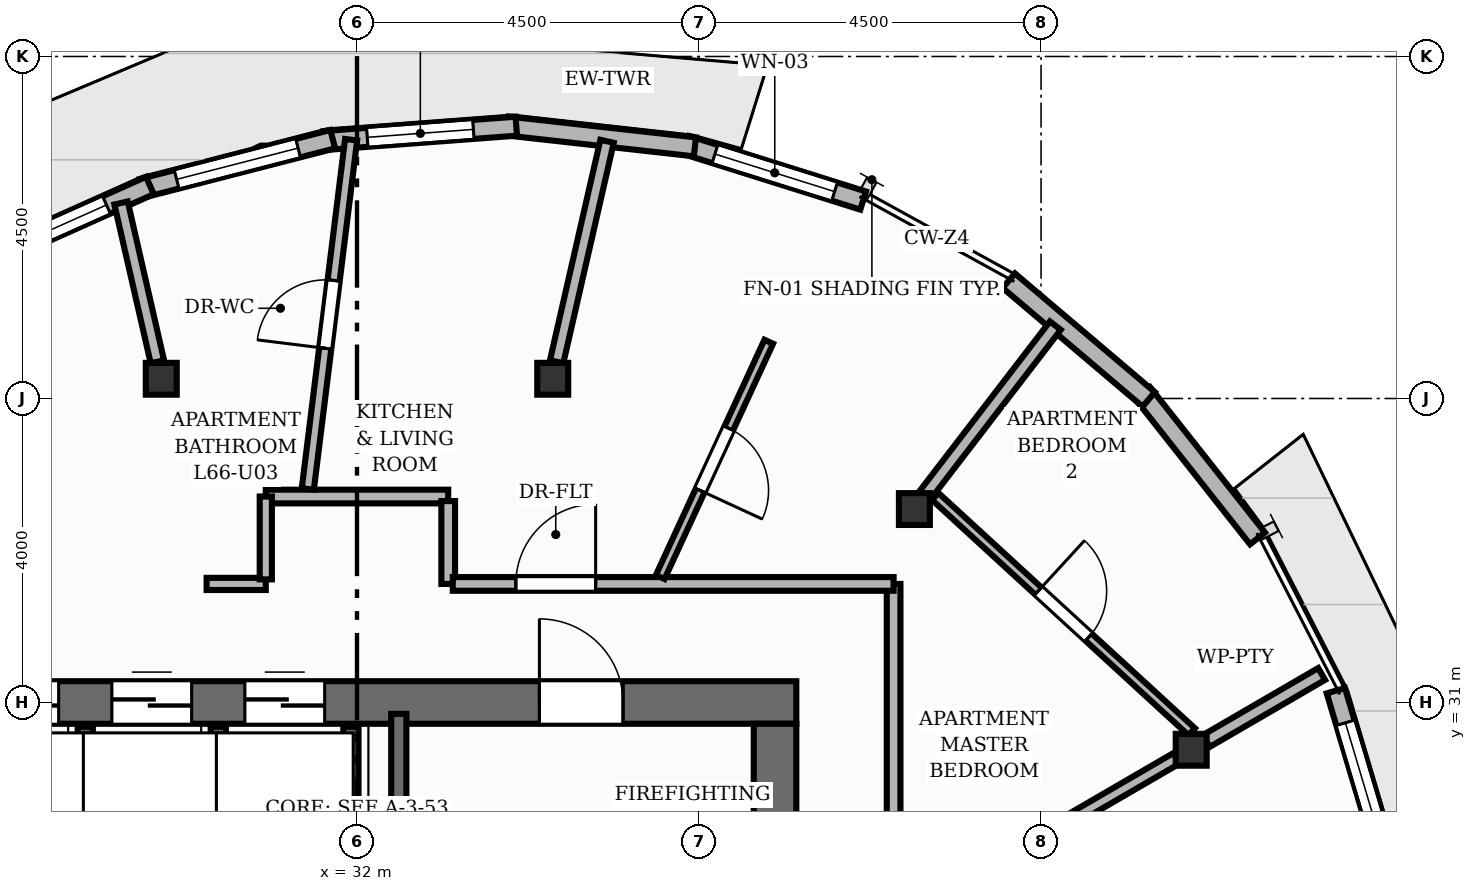
"""IFC4 building model, lengths in metres.
Left out: names, types, materials, properties, quantities, classifications, styles, units other than length and angle.
Written with IfcOpenShell. Run it as: python <this file> out.ifc"""

import sys

from ifc_helpers import new_model, si_unit, direction, frame, frame_2d, origin, origin_2d, place, context, subcontext, project, spatial, rectangle, i_section, extrude, element, fill, save


model = new_model("IFC4")
c1 = context("Model", 3, precision=1e-05, world=origin(), true_north=direction((0.0, 1.0)))
c2 = subcontext(c1, "Body", "Model", "MODEL_VIEW")
j1 = project(units=[si_unit("LENGTHUNIT", "METRE"), si_unit("PLANEANGLEUNIT", "RADIAN")], contexts=[c1])
p1 = place(None, origin())
s1 = spatial("IfcSite", under=j1, at=p1, CompositionType="ELEMENT")
p2 = place(p1, origin())
s2 = spatial("IfcBuilding", under=s1, at=p2, CompositionType="ELEMENT")
p3 = place(p2, frame((0.0, 0.0, 220.64)))
s3 = spatial("IfcBuildingStorey", under=s2, at=p3, CompositionType="ELEMENT", Elevation=220.64)
p4 = place(p3, frame((26.22, 31.0, 0.0), z_axis=(0.0, 0.0, 1.0), x_axis=(1.0, 0.0, 0.0)))
e1 = element("IfcWall", 1, at=p4, inside=s3, PredefinedType="SHEAR", context=c2, shape_type="SweptSolid", body=[
    extrude(rectangle(XDim=11.56, YDim=0.56, at=frame_2d((5.78, 0.0))), origin(), (0.0, 0.0, 1.0), 3.2),
])
p5 = place(p4, frame((8.18, 0.0, 0.0)))
e2 = element("IfcOpeningElement", 2, at=p5, cuts=e1, PredefinedType="OPENING", context=c2, shape_type="SweptSolid", body=[
    extrude(rectangle(XDim=1.1, YDim=2.15, at=frame_2d((0.55, 1.075))), frame((0.0, 0.29, 0.0), z_axis=(0.0, -1.0, 0.0), x_axis=(1.0, 0.0, 0.0)), (0.0, 0.0, 1.0), 0.58),
])
p6 = place(p4, frame((0.805, 0.0, 0.0)))
e3 = element("IfcOpeningElement", 3, at=p6, cuts=e1, PredefinedType="OPENING", context=c2, shape_type="SweptSolid", body=[
    extrude(rectangle(XDim=1.05, YDim=2.15, at=frame_2d((0.525, 1.075))), frame((0.0, 0.29, 0.0), z_axis=(0.0, -1.0, 0.0), x_axis=(1.0, 0.0, 0.0)), (0.0, 0.0, 1.0), 0.58),
])
p7 = place(p4, frame((2.555, 0.0, 0.0)))
e4 = element("IfcOpeningElement", 4, at=p7, cuts=e1, PredefinedType="OPENING", context=c2, shape_type="SweptSolid", body=[
    extrude(rectangle(XDim=1.05, YDim=2.15, at=frame_2d((0.525, 1.075))), frame((0.0, 0.29, 0.0), z_axis=(0.0, -1.0, 0.0), x_axis=(1.0, 0.0, 0.0)), (0.0, 0.0, 1.0), 0.58),
])
p8 = place(p4, frame((4.305, 0.0, 0.0)))
e5 = element("IfcOpeningElement", 5, at=p8, cuts=e1, PredefinedType="OPENING", context=c2, shape_type="SweptSolid", body=[
    extrude(rectangle(XDim=1.05, YDim=2.15, at=frame_2d((0.525, 1.075))), frame((0.0, 0.29, 0.0), z_axis=(0.0, -1.0, 0.0), x_axis=(1.0, 0.0, 0.0)), (0.0, 0.0, 1.0), 0.58),
])
p9 = place(p3, frame((37.5, 17.28, 0.0), z_axis=(0.0, 0.0, 1.0), x_axis=(0.0, 1.0, 0.0)))
e6 = element("IfcWall", 6, at=p9, inside=s3, PredefinedType="SHEAR", context=c2, shape_type="SweptSolid", body=[
    extrude(rectangle(XDim=13.44, YDim=0.56, at=frame_2d((6.72, 0.0))), origin(), (0.0, 0.0, 1.0), 3.2),
])
for number, where, z_axis, x_axis in (
    (7, (42.975, 30.378, 0.0), (0.0, 0.0, 1.0), (1.0, 0.0, 0.0)),
    (8, (39.333, 33.545, 0.0), (0.0, 0.0, 1.0), (1.0, 0.0, 0.0)),
    (9, (34.575, 35.26, 0.0), (0.0, 0.0, 1.0), (1.0, 0.0, 0.0)),
    (10, (29.425, 35.26, 0.0), (0.0, 0.0, 1.0), (1.0, 0.0, 0.0)),
):
    element("IfcColumn", number, at=place(p3, frame(where, z_axis=z_axis, x_axis=x_axis)), inside=s3, PredefinedType="COLUMN", context=c2, shape_type="SweptSolid", body=[
        extrude(i_section(OverallWidth=0.407, OverallDepth=0.419, WebThickness=0.031, FlangeThickness=0.049, at=origin_2d()), origin(), (0.0, 0.0, 1.0), 3.2),
    ])
p10 = place(p3, frame((36.334, 38.334, 0.0), z_axis=(0.0, 0.0, 1.0), x_axis=(0.95407801166, -0.299558254212, 0.0)))
e11 = element("IfcWall", 11, at=p10, inside=s3, PredefinedType="SOLIDWALL", context=c2, shape_type="SweptSolid", body=[
    extrude(rectangle(XDim=2.437, YDim=0.25, at=frame_2d((1.218, 0.0))), origin(), (0.0, 0.0, 1.0), 2.96),
])
p11 = place(p10, frame((0.393, 0.0, 0.85)))
e12 = element("IfcOpeningElement", 12, at=p11, cuts=e11, PredefinedType="OPENING", context=c2, shape_type="SweptSolid", body=[
    extrude(rectangle(XDim=1.65, YDim=1.55, at=frame_2d((0.825, 0.775))), frame((0.0, 0.135, 0.0), z_axis=(0.0, -1.0, 0.0), x_axis=(1.0, 0.0, 0.0)), (0.0, 0.0, 1.0), 0.27),
])
p12 = place(p3, frame((33.983, 38.585, 0.0), z_axis=(0.0, 0.0, 1.0), x_axis=(0.993859679734, -0.110647806121, 0.0)))
e13 = element("IfcWall", 13, at=p12, inside=s3, PredefinedType="SOLIDWALL", context=c2, shape_type="SweptSolid", body=[
    extrude(rectangle(XDim=2.478, YDim=0.25, at=frame_2d((1.239, 0.0))), origin(), (0.0, 0.0, 1.0), 2.96),
])
p13 = place(p3, frame((31.571, 38.394, 0.0), z_axis=(0.0, 0.0, 1.0), x_axis=(0.997203982256, 0.074727623888, 0.0)))
e14 = element("IfcWall", 14, at=p13, inside=s3, PredefinedType="SOLIDWALL", context=c2, shape_type="SweptSolid", body=[
    extrude(rectangle(XDim=2.532, YDim=0.25, at=frame_2d((1.266, 0.0))), origin(), (0.0, 0.0, 1.0), 2.96),
])
p14 = place(p13, frame((0.566, 0.0, 0.85)))
e15 = element("IfcOpeningElement", 15, at=p14, cuts=e14, PredefinedType="OPENING", context=c2, shape_type="SweptSolid", body=[
    extrude(rectangle(XDim=1.4, YDim=1.55, at=frame_2d((0.7, 0.775))), frame((0.0, 0.135, 0.0), z_axis=(0.0, -1.0, 0.0), x_axis=(1.0, 0.0, 0.0)), (0.0, 0.0, 1.0), 0.27),
])
p15 = place(p3, frame((29.171, 37.766, 0.0), z_axis=(0.0, 0.0, 1.0), x_axis=(0.968423445169, 0.249311112562, 0.0)))
e16 = element("IfcWall", 16, at=p15, inside=s3, PredefinedType="SOLIDWALL", context=c2, shape_type="SweptSolid", body=[
    extrude(rectangle(XDim=2.592, YDim=0.25, at=frame_2d((1.296, 0.0))), origin(), (0.0, 0.0, 1.0), 2.96),
])
p16 = place(p15, frame((0.471, 0.0, 0.85)))
e17 = element("IfcOpeningElement", 17, at=p16, cuts=e16, PredefinedType="OPENING", context=c2, shape_type="SweptSolid", body=[
    extrude(rectangle(XDim=1.65, YDim=1.55, at=frame_2d((0.825, 0.775))), frame((0.0, 0.135, 0.0), z_axis=(0.0, -1.0, 0.0), x_axis=(1.0, 0.0, 0.0)), (0.0, 0.0, 1.0), 0.27),
])
p17 = place(p3, frame((26.855, 36.719, 0.0), z_axis=(0.0, 0.0, 1.0), x_axis=(0.912779399898, 0.408452894617, 0.0)))
e18 = element("IfcWall", 18, at=p17, inside=s3, PredefinedType="SOLIDWALL", context=c2, shape_type="SweptSolid", body=[
    extrude(rectangle(XDim=2.651, YDim=0.25, at=frame_2d((1.325, 0.0))), origin(), (0.0, 0.0, 1.0), 2.96),
])
p18 = place(p17, frame((0.625, 0.0, 0.85)))
e19 = element("IfcOpeningElement", 19, at=p18, cuts=e18, PredefinedType="OPENING", context=c2, shape_type="SweptSolid", body=[
    extrude(rectangle(XDim=1.4, YDim=1.52, at=frame_2d((0.7, 0.76))), frame((0.0, 0.135, 0.0), z_axis=(0.0, -1.0, 0.0), x_axis=(1.0, 0.0, 0.0)), (0.0, 0.0, 1.0), 0.27),
])
p19 = place(p3, frame((44.878, 31.156, 0.0), z_axis=(0.0, 0.0, 1.0), x_axis=(0.285604720301, -0.958347506775, 0.0)))
e20 = element("IfcWall", 20, at=p19, inside=s3, PredefinedType="SOLIDWALL", context=c2, shape_type="SweptSolid", body=[
    extrude(rectangle(XDim=2.532, YDim=0.25, at=frame_2d((1.266, 0.0))), origin(), (0.0, 0.0, 1.0), 2.96),
])
p20 = place(p19, frame((0.441, 0.0, 0.85)))
e21 = element("IfcOpeningElement", 21, at=p20, cuts=e20, PredefinedType="OPENING", context=c2, shape_type="SweptSolid", body=[
    extrude(rectangle(XDim=1.65, YDim=1.55, at=frame_2d((0.825, 0.775))), frame((0.0, 0.135, 0.0), z_axis=(0.0, -1.0, 0.0), x_axis=(1.0, 0.0, 0.0)), (0.0, 0.0, 1.0), 0.27),
])
p21 = place(p3, frame((42.337, 35.071, 0.0), z_axis=(0.0, 0.0, 1.0), x_axis=(0.619881401672, -0.784695512833, 0.0)))
e22 = element("IfcWall", 22, at=p21, inside=s3, PredefinedType="SOLIDWALL", context=c2, shape_type="SweptSolid", body=[
    extrude(rectangle(XDim=2.437, YDim=0.25, at=frame_2d((1.218, 0.0))), origin(), (0.0, 0.0, 1.0), 2.96),
])
p22 = place(p3, frame((40.575, 36.55, 0.0), z_axis=(0.0, 0.0, 1.0), x_axis=(0.762614923672, -0.646852748462, 0.0)))
e23 = element("IfcWall", 23, at=p22, inside=s3, PredefinedType="SOLIDWALL", context=c2, shape_type="SweptSolid", body=[
    extrude(rectangle(XDim=2.415, YDim=0.25, at=frame_2d((1.208, 0.0))), origin(), (0.0, 0.0, 1.0), 2.96),
])
p23 = place(p3, frame((32.55, 27.35, 0.0), z_axis=(0.0, 0.0, 1.0), x_axis=(0.0, 1.0, 0.0)))
e24 = element("IfcWall", 24, at=p23, inside=s3, PredefinedType="SHEAR", context=c2, shape_type="SweptSolid", body=[
    extrude(rectangle(XDim=3.5, YDim=0.2, at=frame_2d((1.75, 0.0))), origin(), (0.0, 0.0, 1.0), 3.2),
])
for number, where, z_axis, x_axis in (
    (25, (31.92, 29.02, 0.0), (0.0, 0.0, 1.0), (0.0, 1.0, 0.0)),
    (26, (28.425, 29.02, 0.0), (0.0, 0.0, 1.0), (0.0, 1.0, 0.0)),
    (27, (30.175, 29.02, 0.0), (0.0, 0.0, 1.0), (0.0, 1.0, 0.0)),
):
    element("IfcWall", number, at=place(p3, frame(where, z_axis=z_axis, x_axis=x_axis)), inside=s3, PredefinedType="SHEAR", context=c2, shape_type="SweptSolid", body=[
        extrude(rectangle(XDim=1.66, YDim=0.2, at=frame_2d((0.83, 0.0))), origin(), (0.0, 0.0, 1.0), 3.2),
    ])
p24 = place(p3, frame((43.174, 30.493, 0.0), z_axis=(0.0, 0.0, 1.0), x_axis=(0.864599922959, 0.502460917106, 0.0)))
e28 = element("IfcWall", 28, at=p24, inside=s3, PredefinedType="PARTITIONING", context=c2, shape_type="SweptSolid", body=[
    extrude(rectangle(XDim=1.756, YDim=0.18, at=frame_2d((0.878, 0.0))), origin(), (0.0, 0.0, 1.0), 2.404),
])
p25 = place(p3, frame((39.473, 33.727, 0.0), z_axis=(0.0, 0.0, 1.0), x_axis=(0.609232660573, 0.792991529142, 0.0)))
e29 = element("IfcWall", 29, at=p25, inside=s3, PredefinedType="PARTITIONING", context=c2, shape_type="SweptSolid", body=[
    extrude(rectangle(XDim=2.814, YDim=0.18, at=frame_2d((1.407, 0.0))), origin(), (0.0, 0.0, 1.0), 2.404),
])
p26 = place(p3, frame((34.626, 35.483, 0.0), z_axis=(0.0, 0.0, 1.0), x_axis=(0.22291168124, 0.974838644272, 0.0)))
e30 = element("IfcWall", 30, at=p26, inside=s3, PredefinedType="PARTITIONING", context=c2, shape_type="SweptSolid", body=[
    extrude(rectangle(XDim=2.976, YDim=0.18, at=frame_2d((1.488, 0.0))), origin(), (0.0, 0.0, 1.0), 2.404),
])
p27 = place(p3, frame((29.374, 35.483, 0.0), z_axis=(0.0, 0.0, 1.0), x_axis=(-0.222945438732, 0.974830924493, 0.0)))
e31 = element("IfcWall", 31, at=p27, inside=s3, PredefinedType="PARTITIONING", context=c2, shape_type="SweptSolid", body=[
    extrude(rectangle(XDim=2.143, YDim=0.18, at=frame_2d((1.072, 0.0))), origin(), (0.0, 0.0, 1.0), 2.404),
])
p28 = place(p3, frame((39.06, 32.56, 0.0), z_axis=(0.0, 0.0, 1.0), x_axis=(0.0, -1.0, 0.0)))
e32 = element("IfcWall", 32, at=p28, inside=s3, PredefinedType="PARTITIONING", context=c2, shape_type="SweptSolid", body=[
    extrude(rectangle(XDim=17.12, YDim=0.18, at=frame_2d((8.56, 0.0))), origin(), (0.0, 0.0, 1.0), 2.955),
])
p29 = place(p28, frame((8.815, 0.0, 0.0)))
e33 = element("IfcOpeningElement", 33, at=p29, cuts=e32, PredefinedType="OPENING", context=c2, shape_type="SweptSolid", body=[
    extrude(rectangle(XDim=1.05, YDim=2.15, at=frame_2d((0.525, 1.075))), frame((0.0, 0.1, 0.0), z_axis=(0.0, -1.0, 0.0), x_axis=(1.0, 0.0, 0.0)), (0.0, 0.0, 1.0), 0.2),
])
p30 = place(p3, frame((30.8, 33.71, 0.0), z_axis=(0.0, 0.0, 1.0), x_axis=(1.0, 0.0, 0.0)))
e34 = element("IfcWall", 34, at=p30, inside=s3, PredefinedType="PARTITIONING", context=c2, shape_type="SweptSolid", body=[
    extrude(rectangle(XDim=2.4, YDim=0.18, at=frame_2d((1.2, 0.0))), origin(), (0.0, 0.0, 1.0), 2.955),
])
p31 = place(p3, frame((33.2, 33.65, 0.0), z_axis=(0.0, 0.0, 1.0), x_axis=(0.0, -1.0, 0.0)))
e35 = element("IfcWall", 35, at=p31, inside=s3, PredefinedType="PARTITIONING", context=c2, shape_type="SweptSolid", body=[
    extrude(rectangle(XDim=1.09, YDim=0.18, at=frame_2d((0.545, 0.0))), origin(), (0.0, 0.0, 1.0), 2.955),
])
p32 = place(p3, frame((33.26, 32.56, 0.0), z_axis=(0.0, 0.0, 1.0), x_axis=(1.0, 0.0, 0.0)))
e36 = element("IfcWall", 36, at=p32, inside=s3, PredefinedType="PARTITIONING", context=c2, shape_type="SweptSolid", body=[
    extrude(rectangle(XDim=5.8, YDim=0.18, at=frame_2d((2.9, 0.0))), origin(), (0.0, 0.0, 1.0), 2.955),
])
p33 = place(p32, frame((0.83, 0.0, 0.0)))
e37 = element("IfcOpeningElement", 37, at=p33, cuts=e36, PredefinedType="OPENING", context=c2, shape_type="SweptSolid", body=[
    extrude(rectangle(XDim=1.05, YDim=2.15, at=frame_2d((0.525, 1.075))), frame((0.0, 0.1, 0.0), z_axis=(0.0, -1.0, 0.0), x_axis=(1.0, 0.0, 0.0)), (0.0, 0.0, 1.0), 0.2),
])
p34 = place(p3, frame((30.022, 32.56, 0.0), z_axis=(0.0, 0.0, 1.0), x_axis=(1.0, 0.0, 0.0)))
e38 = element("IfcWall", 38, at=p34, inside=s3, PredefinedType="PLUMBINGWALL", context=c2, shape_type="SweptSolid", body=[
    extrude(rectangle(XDim=0.778, YDim=0.16, at=frame_2d((0.389, 0.0))), origin(), (0.0, 0.0, 1.0), 2.955),
])
p35 = place(p3, frame((30.8, 32.62, 0.0), z_axis=(0.0, 0.0, 1.0), x_axis=(0.0, 1.0, 0.0)))
e39 = element("IfcWall", 39, at=p35, inside=s3, PredefinedType="PLUMBINGWALL", context=c2, shape_type="SweptSolid", body=[
    extrude(rectangle(XDim=1.09, YDim=0.16, at=frame_2d((0.545, 0.0))), origin(), (0.0, 0.0, 1.0), 2.955),
])
p36 = place(p3, frame((39.06, 28.103, 0.0), z_axis=(0.0, 0.0, 1.0), x_axis=(0.864618907014, 0.502428249239, 0.0)))
e40 = element("IfcWall", 40, at=p36, inside=s3, PredefinedType="PLUMBINGWALL", context=c2, shape_type="SweptSolid", body=[
    extrude(rectangle(XDim=4.305, YDim=0.16, at=frame_2d((2.153, 0.0))), origin(), (0.0, 0.0, 1.0), 2.404),
])
p37 = place(p3, frame((31.353, 33.809, 0.0), z_axis=(0.0, 0.0, 1.0), x_axis=(0.123041966912, 0.992401468348, 0.0)))
e41 = element("IfcWall", 41, at=p37, inside=s3, PredefinedType="PLUMBINGWALL", context=c2, shape_type="SweptSolid", body=[
    extrude(rectangle(XDim=4.631, YDim=0.16, at=frame_2d((2.315, 0.0))), origin(), (0.0, 0.0, 1.0), 2.692),
])
p38 = place(p37, frame((1.865, 0.0, 0.0)))
e42 = element("IfcOpeningElement", 42, at=p38, cuts=e41, PredefinedType="OPENING", context=c2, shape_type="SweptSolid", body=[
    extrude(rectangle(XDim=0.9, YDim=2.1, at=frame_2d((0.45, 1.05))), frame((0.0, 0.09, 0.0), z_axis=(0.0, -1.0, 0.0), x_axis=(1.0, 0.0, 0.0)), (0.0, 0.0, 1.0), 0.18),
])
p39 = place(p3, frame((37.417, 35.747, 0.0), z_axis=(0.0, 0.0, 1.0), x_axis=(-0.41880384085, -0.908076727424, 0.0)))
e43 = element("IfcWall", 43, at=p39, inside=s3, PredefinedType="PARTITIONING", context=c2, shape_type="SweptSolid", body=[
    extrude(rectangle(XDim=3.409, YDim=0.125, at=frame_2d((1.705, 0.0))), origin(), (0.0, 0.0, 1.0), 2.955),
])
p40 = place(p39, frame((1.255, 0.0, 0.0)))
e44 = element("IfcOpeningElement", 44, at=p40, cuts=e43, PredefinedType="OPENING", context=c2, shape_type="SweptSolid", body=[
    extrude(rectangle(XDim=0.9, YDim=2.1, at=frame_2d((0.45, 1.05))), frame((0.0, 0.073, 0.0), z_axis=(0.0, -1.0, 0.0), x_axis=(1.0, 0.0, 0.0)), (0.0, 0.0, 1.0), 0.145),
])
p41 = place(p3, frame((39.607, 33.712, 0.0), z_axis=(0.0, 0.0, 1.0), x_axis=(0.736828890574, -0.676079274949, 0.0)))
e45 = element("IfcWall", 45, at=p41, inside=s3, PredefinedType="PARTITIONING", context=c2, shape_type="SweptSolid", body=[
    extrude(rectangle(XDim=4.582, YDim=0.125, at=frame_2d((2.291, 0.0))), origin(), (0.0, 0.0, 1.0), 2.488),
])
p42 = place(p41, frame((1.841, 0.0, 0.0)))
e46 = element("IfcOpeningElement", 46, at=p42, cuts=e45, PredefinedType="OPENING", context=c2, shape_type="SweptSolid", body=[
    extrude(rectangle(XDim=0.9, YDim=2.1, at=frame_2d((0.45, 1.05))), frame((0.0, 0.073, 0.0), z_axis=(0.0, -1.0, 0.0), x_axis=(1.0, 0.0, 0.0)), (0.0, 0.0, 1.0), 0.145),
])
p43 = place(p11, origin())
e47 = element("IfcWindow", 47, at=p43, inside=s3, PartitioningType="SINGLE_PANEL", PredefinedType="WINDOW", context=c2, shape_type="SweptSolid", body=[
    extrude(rectangle(XDim=1.65, YDim=1.55, at=frame_2d((0.825, 0.775))), frame((0.0, 0.03, 0.0), z_axis=(0.0, -1.0, 0.0), x_axis=(1.0, 0.0, 0.0)), (0.0, 0.0, 1.0), 0.06),
])
fill(e12, e47)
p44 = place(p14, origin())
e48 = element("IfcWindow", 48, at=p44, inside=s3, PartitioningType="SINGLE_PANEL", PredefinedType="WINDOW", context=c2, shape_type="SweptSolid", body=[
    extrude(rectangle(XDim=1.4, YDim=1.55, at=frame_2d((0.7, 0.775))), frame((0.0, 0.03, 0.0), z_axis=(0.0, -1.0, 0.0), x_axis=(1.0, 0.0, 0.0)), (0.0, 0.0, 1.0), 0.06),
])
fill(e15, e48)
p45 = place(p16, origin())
e49 = element("IfcWindow", 49, at=p45, inside=s3, PartitioningType="SINGLE_PANEL", PredefinedType="WINDOW", context=c2, shape_type="SweptSolid", body=[
    extrude(rectangle(XDim=1.65, YDim=1.55, at=frame_2d((0.825, 0.775))), frame((0.0, 0.03, 0.0), z_axis=(0.0, -1.0, 0.0), x_axis=(1.0, 0.0, 0.0)), (0.0, 0.0, 1.0), 0.06),
])
fill(e17, e49)
p46 = place(p18, origin())
e50 = element("IfcWindow", 50, at=p46, inside=s3, PartitioningType="SINGLE_PANEL", PredefinedType="WINDOW", context=c2, shape_type="SweptSolid", body=[
    extrude(rectangle(XDim=1.4, YDim=1.52, at=frame_2d((0.7, 0.76))), frame((0.0, 0.03, 0.0), z_axis=(0.0, -1.0, 0.0), x_axis=(1.0, 0.0, 0.0)), (0.0, 0.0, 1.0), 0.06),
])
fill(e19, e50)
p47 = place(p20, origin())
e51 = element("IfcWindow", 51, at=p47, inside=s3, PartitioningType="SINGLE_PANEL", PredefinedType="WINDOW", context=c2, shape_type="SweptSolid", body=[
    extrude(rectangle(XDim=1.65, YDim=1.55, at=frame_2d((0.825, 0.775))), frame((0.0, 0.03, 0.0), z_axis=(0.0, -1.0, 0.0), x_axis=(1.0, 0.0, 0.0)), (0.0, 0.0, 1.0), 0.06),
])
fill(e21, e51)
p48 = place(p5, origin())
e52 = element("IfcDoor", 52, at=p48, inside=s3, OperationType="SINGLE_SWING_LEFT", PredefinedType="DOOR", context=c2, shape_type="SweptSolid", body=[
    extrude(rectangle(XDim=1.1, YDim=2.15, at=frame_2d((0.55, 1.075))), frame((0.0, 0.025, 0.0), z_axis=(0.0, -1.0, 0.0), x_axis=(1.0, 0.0, 0.0)), (0.0, 0.0, 1.0), 0.05),
])
fill(e2, e52)
p49 = place(p6, origin())
e53 = element("IfcDoor", 53, at=p49, inside=s3, OperationType="DOUBLE_DOOR_SLIDING", PredefinedType="DOOR", context=c2, shape_type="SweptSolid", body=[
    extrude(rectangle(XDim=1.05, YDim=2.15, at=frame_2d((0.525, 1.075))), frame((0.0, 0.025, 0.0), z_axis=(0.0, -1.0, 0.0), x_axis=(1.0, 0.0, 0.0)), (0.0, 0.0, 1.0), 0.05),
])
fill(e3, e53)
p50 = place(p7, origin())
e54 = element("IfcDoor", 54, at=p50, inside=s3, OperationType="DOUBLE_DOOR_SLIDING", PredefinedType="DOOR", context=c2, shape_type="SweptSolid", body=[
    extrude(rectangle(XDim=1.05, YDim=2.15, at=frame_2d((0.525, 1.075))), frame((0.0, 0.025, 0.0), z_axis=(0.0, -1.0, 0.0), x_axis=(1.0, 0.0, 0.0)), (0.0, 0.0, 1.0), 0.05),
])
fill(e4, e54)
p51 = place(p8, origin())
e55 = element("IfcDoor", 55, at=p51, inside=s3, OperationType="DOUBLE_DOOR_SLIDING", PredefinedType="DOOR", context=c2, shape_type="SweptSolid", body=[
    extrude(rectangle(XDim=1.05, YDim=2.15, at=frame_2d((0.525, 1.075))), frame((0.0, 0.025, 0.0), z_axis=(0.0, -1.0, 0.0), x_axis=(1.0, 0.0, 0.0)), (0.0, 0.0, 1.0), 0.05),
])
fill(e5, e55)
p52 = place(p33, origin())
e56 = element("IfcDoor", 56, at=p52, inside=s3, OperationType="SINGLE_SWING_RIGHT", PredefinedType="DOOR", context=c2, shape_type="SweptSolid", body=[
    extrude(rectangle(XDim=1.05, YDim=2.15, at=frame_2d((0.525, 1.075))), frame((0.0, 0.025, 0.0), z_axis=(0.0, -1.0, 0.0), x_axis=(1.0, 0.0, 0.0)), (0.0, 0.0, 1.0), 0.05),
])
fill(e37, e56)
p53 = place(p38, origin())
e57 = element("IfcDoor", 57, at=p53, inside=s3, OperationType="SINGLE_SWING_LEFT", PredefinedType="DOOR", context=c2, shape_type="SweptSolid", body=[
    extrude(rectangle(XDim=0.9, YDim=2.1, at=frame_2d((0.45, 1.05))), frame((0.0, 0.025, 0.0), z_axis=(0.0, -1.0, 0.0), x_axis=(1.0, 0.0, 0.0)), (0.0, 0.0, 1.0), 0.05),
])
fill(e42, e57)
p54 = place(p40, origin())
e58 = element("IfcDoor", 58, at=p54, inside=s3, OperationType="SINGLE_SWING_RIGHT", PredefinedType="DOOR", context=c2, shape_type="SweptSolid", body=[
    extrude(rectangle(XDim=0.9, YDim=2.1, at=frame_2d((0.45, 1.05))), frame((0.0, 0.025, 0.0), z_axis=(0.0, -1.0, 0.0), x_axis=(1.0, 0.0, 0.0)), (0.0, 0.0, 1.0), 0.05),
])
fill(e44, e58)
p55 = place(p42, origin())
e59 = element("IfcDoor", 59, at=p55, inside=s3, OperationType="SINGLE_SWING_LEFT", PredefinedType="DOOR", context=c2, shape_type="SweptSolid", body=[
    extrude(rectangle(XDim=0.9, YDim=2.1, at=frame_2d((0.45, 1.05))), frame((0.0, 0.025, 0.0), z_axis=(0.0, -1.0, 0.0), x_axis=(1.0, 0.0, 0.0)), (0.0, 0.0, 1.0), 0.05),
])
fill(e46, e59)
save(model, sys.argv[1])
